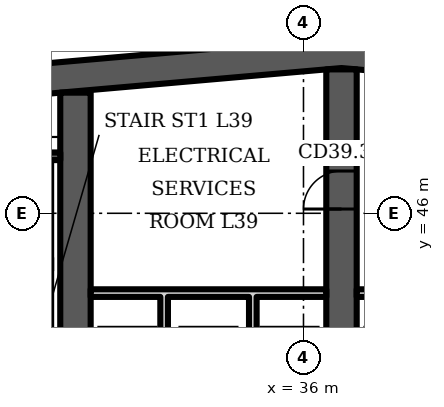
"""IFC4 building model, lengths in metres.
Left out: names, types, materials, properties, quantities, classifications, styles, units other than length and angle.
Written with IfcOpenShell. Run it as: python <this file> out.ifc"""

import sys

from ifc_helpers import new_model, si_unit, direction, frame, frame_2d, origin, place, context, subcontext, project, spatial, polyline, rectangle, outline, extrude, element, fill, save


model = new_model("IFC4")
c1 = context("Model", 3, precision=1e-05, world=origin(), true_north=direction((0.0, 1.0)))
c2 = subcontext(c1, "Body", "Model", "MODEL_VIEW")
j1 = project(units=[si_unit("LENGTHUNIT", "METRE"), si_unit("PLANEANGLEUNIT", "RADIAN")], contexts=[c1])
p1 = place(None, origin())
s1 = spatial("IfcSite", under=j1, at=p1, CompositionType="ELEMENT")
p2 = place(p1, origin())
s2 = spatial("IfcBuilding", under=s1, at=p2, CompositionType="ELEMENT")
p3 = place(p2, frame((0.0, 0.0, 162.7)))
s3 = spatial("IfcBuildingStorey", under=s2, at=p3, CompositionType="ELEMENT", Elevation=162.7)
p4 = place(p3, origin())
e1 = element("IfcWall", 1, at=p4, inside=s3, PredefinedType="SHEAR", context=c2, shape_type="SweptSolid", body=[
    extrude(outline(polyline([(16.0, 47.984), (37.0, 49.822), (58.0, 47.984), (58.0, 48.787), (37.0, 50.625), (16.0, 48.787), (16.0, 47.984)])), origin(), (0.0, 0.0, 1.0), 3.6),
])
p5 = place(p3, frame((30.0, 34.8, 0.0), z_axis=(0.0, 0.0, 1.0), x_axis=(0.0, 1.0, 0.0)))
e2 = element("IfcWall", 2, at=p5, inside=s3, PredefinedType="SHEAR", context=c2, shape_type="SweptSolid", body=[
    extrude(rectangle(XDim=14.374, YDim=0.8, at=frame_2d((7.187, 0.0))), origin(), (0.0, 0.0, 1.0), 3.6),
])
p6 = place(p5, frame((3.6, 0.0, 0.0)))
e3 = element("IfcOpeningElement", 3, at=p6, cuts=e2, PredefinedType="OPENING", context=c2, shape_type="SweptSolid", body=[
    extrude(rectangle(XDim=1.1, YDim=2.1, at=frame_2d((0.55, 1.05))), frame((0.0, 0.41, 0.0), z_axis=(0.0, -1.0, 0.0), x_axis=(1.0, 0.0, 0.0)), (0.0, 0.0, 1.0), 0.82),
])
p7 = place(p3, frame((37.0, 34.8, 0.0), z_axis=(0.0, 0.0, 1.0), x_axis=(0.0, 1.0, 0.0)))
e4 = element("IfcWall", 4, at=p7, inside=s3, PredefinedType="SHEAR", context=c2, shape_type="SweptSolid", body=[
    extrude(rectangle(XDim=14.987, YDim=0.8, at=frame_2d((7.493, 0.0))), origin(), (0.0, 0.0, 1.0), 3.6),
])
p8 = place(p7, frame((11.312, 0.0, 0.0)))
e5 = element("IfcOpeningElement", 5, at=p8, cuts=e4, PredefinedType="OPENING", context=c2, shape_type="SweptSolid", body=[
    extrude(rectangle(XDim=1.0, YDim=2.1, at=frame_2d((0.5, 1.05))), frame((0.0, 0.41, 0.0), z_axis=(0.0, -1.0, 0.0), x_axis=(1.0, 0.0, 0.0)), (0.0, 0.0, 1.0), 0.82),
])
p9 = place(p7, frame((3.6, 0.0, 0.0)))
e6 = element("IfcOpeningElement", 6, at=p9, cuts=e4, PredefinedType="OPENING", context=c2, shape_type="SweptSolid", body=[
    extrude(rectangle(XDim=1.1, YDim=2.1, at=frame_2d((0.55, 1.05))), frame((0.0, 0.41, 0.0), z_axis=(0.0, -1.0, 0.0), x_axis=(1.0, 0.0, 0.0)), (0.0, 0.0, 1.0), 0.82),
])
p10 = place(p3, frame((25.75, 47.5, 0.0), z_axis=(0.0, 0.0, 1.0), x_axis=(1.0, 0.0, 0.0)))
e7 = element("IfcWall", 7, at=p10, inside=s3, PredefinedType="SHEAR", context=c2, shape_type="SweptSolid", body=[
    extrude(rectangle(XDim=3.85, YDim=0.2, at=frame_2d((1.925, 0.0))), origin(), (0.0, 0.0, 1.0), 3.2),
])
p11 = place(p3, frame((0.0, 0.0, -0.0)))
e8 = element("IfcWall", 8, at=p11, inside=s3, PredefinedType="PARTITIONING", context=c2, shape_type="SweptSolid", body=[
    extrude(outline(polyline([(32.433, 40.8), (32.233, 40.8), (32.233, 43.8), (30.4, 43.8), (30.4, 44.0), (36.6, 44.0), (36.6, 43.8), (34.767, 43.8), (34.767, 40.8), (34.567, 40.8), (34.567, 43.8), (32.433, 43.8), (32.433, 40.8)])), origin(), (0.0, 0.0, 1.0), 3.2),
])
p12 = place(p3, frame((0.0, 0.0, -0.0)))
e9 = element("IfcWall", 9, at=p12, inside=s3, PredefinedType="PARTITIONING", context=c2, shape_type="SweptSolid", body=[
    extrude(outline(polyline([(39.433, 40.8), (39.233, 40.8), (39.233, 43.8), (37.4, 43.8), (37.4, 44.0), (43.6, 44.0), (43.6, 43.8), (41.767, 43.8), (41.767, 40.8), (41.567, 40.8), (41.567, 43.8), (39.433, 43.8), (39.433, 40.8)])), origin(), (0.0, 0.0, 1.0), 3.2),
])
p13 = place(p8, origin())
e10 = element("IfcDoor", 10, at=p13, inside=s3, OperationType="SINGLE_SWING_LEFT", PredefinedType="DOOR", context=c2, shape_type="SweptSolid", body=[
    extrude(rectangle(XDim=1.0, YDim=2.1, at=frame_2d((0.5, 1.05))), frame((0.0, 0.4, 0.0), z_axis=(0.0, -1.0, 0.0), x_axis=(1.0, 0.0, 0.0)), (0.0, 0.0, 1.0), 0.8),
])
fill(e5, e10)
save(model, sys.argv[1])
